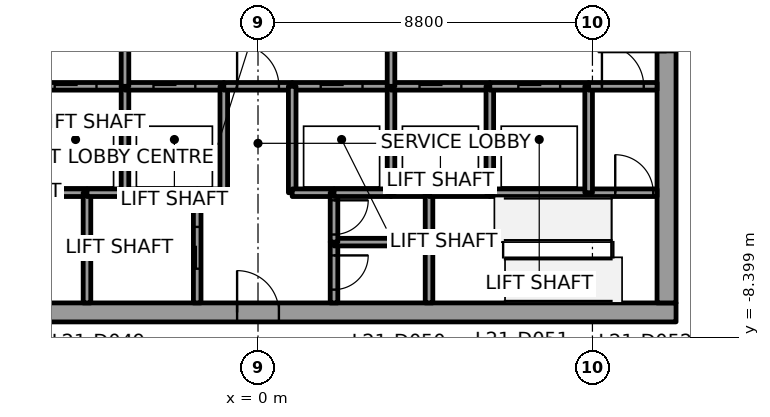
"""IFC4 building model, lengths in metres.
Left out: names, types, materials, properties, quantities, classifications, styles, units other than length and angle.
Written with IfcOpenShell. Run it as: python <this file> out.ifc"""

import sys

from ifc_helpers import new_model, si_unit, direction, frame, frame_2d, origin, place, context, subcontext, project, spatial, rectangle, extrude, element, fill, save


model = new_model("IFC4")
c1 = context("Model", 3, precision=1e-05, world=origin(), true_north=direction((0.0, 1.0)))
c2 = subcontext(c1, "Body", "Model", "MODEL_VIEW")
j1 = project(units=[si_unit("LENGTHUNIT", "METRE"), si_unit("PLANEANGLEUNIT", "RADIAN")], contexts=[c1])
p1 = place(None, origin())
s1 = spatial("IfcSite", under=j1, at=p1, CompositionType="ELEMENT")
p2 = place(p1, origin())
s2 = spatial("IfcBuilding", under=s1, at=p2, CompositionType="ELEMENT")
p3 = place(p2, frame((0.0, 0.0, 99.8)))
s3 = spatial("IfcBuildingStorey", under=s2, at=p3, CompositionType="ELEMENT", Elevation=99.8)
p4 = place(p3, frame((-11.0, -7.75, 0.0), z_axis=(0.0, 0.0, 1.0), x_axis=(1.0, 0.0, 0.0)))
e1 = element("IfcWall", 1, at=p4, inside=s3, PredefinedType="SHEAR", context=c2, shape_type="SweptSolid", body=[
    extrude(rectangle(XDim=22.0, YDim=0.5, at=frame_2d((11.0, 0.0))), origin(), (0.0, 0.0, 1.0), 3.7),
])
p5 = place(p4, frame((10.45, 0.0, 0.0)))
e2 = element("IfcOpeningElement", 2, at=p5, cuts=e1, PredefinedType="OPENING", context=c2, shape_type="SweptSolid", body=[
    extrude(rectangle(XDim=1.1, YDim=2.1, at=frame_2d((0.55, 1.05))), frame((0.0, 0.25, 0.0), z_axis=(0.0, -1.0, 0.0), x_axis=(1.0, 0.0, 0.0)), (0.0, 0.0, 1.0), 0.5),
])
p6 = place(p3, frame((10.75, -7.5, 0.0), z_axis=(0.0, 0.0, 1.0), x_axis=(0.0, 1.0, 0.0)))
e3 = element("IfcWall", 3, at=p6, inside=s3, PredefinedType="SHEAR", context=c2, shape_type="SweptSolid", body=[
    extrude(rectangle(XDim=15.0, YDim=0.5, at=frame_2d((7.5, 0.0))), origin(), (0.0, 0.0, 1.0), 3.7),
])
p7 = place(p6, frame((6.6, 0.0, 0.0)))
e4 = element("IfcOpeningElement", 4, at=p7, cuts=e3, PredefinedType="OPENING", context=c2, shape_type="SweptSolid", body=[
    extrude(rectangle(XDim=1.8, YDim=2.1, at=frame_2d((0.9, 1.05))), frame((0.0, 0.25, 0.0), z_axis=(0.0, -1.0, 0.0), x_axis=(1.0, 0.0, 0.0)), (0.0, 0.0, 1.0), 0.5),
])
p8 = place(p3, frame((-6.1, -4.6, 0.0), z_axis=(0.0, 0.0, 1.0), x_axis=(1.0, 0.0, 0.0)))
e5 = element("IfcWall", 5, at=p8, inside=s3, PredefinedType="SOLIDWALL", context=c2, shape_type="SweptSolid", body=[
    extrude(rectangle(XDim=1.6, YDim=0.2, at=frame_2d((0.8, 0.0))), origin(), (0.0, 0.0, 1.0), 3.55),
])
p9 = place(p3, frame((-6.1, -1.8, 0.0), z_axis=(0.0, 0.0, 1.0), x_axis=(1.0, 0.0, 0.0)))
e6 = element("IfcWall", 6, at=p9, inside=s3, PredefinedType="SOLIDWALL", context=c2, shape_type="SweptSolid", body=[
    extrude(rectangle(XDim=2.6, YDim=0.2, at=frame_2d((1.3, 0.0))), origin(), (0.0, 0.0, 1.0), 3.55),
])
p10 = place(p9, frame((0.75, 0.0, 0.0)))
e7 = element("IfcOpeningElement", 7, at=p10, cuts=e6, PredefinedType="OPENING", context=c2, shape_type="SweptSolid", body=[
    extrude(rectangle(XDim=1.1, YDim=2.1, at=frame_2d((0.55, 1.05))), frame((0.0, 0.1, 0.0), z_axis=(0.0, -1.0, 0.0), x_axis=(1.0, 0.0, 0.0)), (0.0, 0.0, 1.0), 0.2),
])
p11 = place(p3, frame((-4.5, -4.6, 0.0), z_axis=(0.0, 0.0, 1.0), x_axis=(0.0, -1.0, 0.0)))
e8 = element("IfcWall", 8, at=p11, inside=s3, PredefinedType="SOLIDWALL", context=c2, shape_type="SweptSolid", body=[
    extrude(rectangle(XDim=2.9, YDim=0.2, at=frame_2d((1.45, 0.0))), origin(), (0.0, 0.0, 1.0), 3.55),
])
p12 = place(p3, frame((-4.5, -4.6, 0.0), z_axis=(0.0, 0.0, 1.0), x_axis=(1.0, 0.0, 0.0)))
e9 = element("IfcWall", 9, at=p12, inside=s3, PredefinedType="SOLIDWALL", context=c2, shape_type="SweptSolid", body=[
    extrude(rectangle(XDim=1.0, YDim=0.2, at=frame_2d((0.5, 0.0))), origin(), (0.0, 0.0, 1.0), 3.55),
])
p13 = place(p3, frame((-3.5, -4.6, 0.0), z_axis=(0.0, 0.0, 1.0), x_axis=(1.0, 0.0, 0.0)))
e10 = element("IfcWall", 10, at=p13, inside=s3, PredefinedType="SOLIDWALL", context=c2, shape_type="SweptSolid", body=[
    extrude(rectangle(XDim=1.9, YDim=0.2, at=frame_2d((0.95, 0.0))), origin(), (0.0, 0.0, 1.0), 3.55),
])
p14 = place(p3, frame((-3.5, -4.6, 0.0), z_axis=(0.0, 0.0, 1.0), x_axis=(0.0, 1.0, 0.0)))
e11 = element("IfcWall", 11, at=p14, inside=s3, PredefinedType="SOLIDWALL", context=c2, shape_type="SweptSolid", body=[
    extrude(rectangle(XDim=2.8, YDim=0.2, at=frame_2d((1.4, 0.0))), origin(), (0.0, 0.0, 1.0), 3.55),
])
p15 = place(p3, frame((-3.5, -1.8, 0.0), z_axis=(0.0, 0.0, 1.0), x_axis=(1.0, 0.0, 0.0)))
e12 = element("IfcWall", 12, at=p15, inside=s3, PredefinedType="SOLIDWALL", context=c2, shape_type="SweptSolid", body=[
    extrude(rectangle(XDim=2.6, YDim=0.2, at=frame_2d((1.3, 0.0))), origin(), (0.0, 0.0, 1.0), 3.55),
])
p16 = place(p15, frame((0.75, 0.0, 0.0)))
e13 = element("IfcOpeningElement", 13, at=p16, cuts=e12, PredefinedType="OPENING", context=c2, shape_type="SweptSolid", body=[
    extrude(rectangle(XDim=1.1, YDim=2.1, at=frame_2d((0.55, 1.05))), frame((0.0, 0.1, 0.0), z_axis=(0.0, -1.0, 0.0), x_axis=(1.0, 0.0, 0.0)), (0.0, 0.0, 1.0), 0.2),
])
p17 = place(p3, frame((-3.5, 1.8, 0.0), z_axis=(0.0, 0.0, 1.0), x_axis=(0.0, -1.0, 0.0)))
e14 = element("IfcWall", 14, at=p17, inside=s3, PredefinedType="SOLIDWALL", context=c2, shape_type="SweptSolid", body=[
    extrude(rectangle(XDim=3.6, YDim=0.2, at=frame_2d((1.8, 0.0))), origin(), (0.0, 0.0, 1.0), 3.55),
])
p18 = place(p17, frame((1.05, 0.0, 0.0)))
e15 = element("IfcOpeningElement", 15, at=p18, cuts=e14, PredefinedType="OPENING", context=c2, shape_type="SweptSolid", body=[
    extrude(rectangle(XDim=1.5, YDim=2.1, at=frame_2d((0.75, 1.05))), frame((0.0, 0.1, 0.0), z_axis=(0.0, -1.0, 0.0), x_axis=(1.0, 0.0, 0.0)), (0.0, 0.0, 1.0), 0.2),
])
p19 = place(p3, frame((-1.6, -7.5, 0.0), z_axis=(0.0, 0.0, 1.0), x_axis=(0.0, 1.0, 0.0)))
e16 = element("IfcWall", 16, at=p19, inside=s3, PredefinedType="SOLIDWALL", context=c2, shape_type="SweptSolid", body=[
    extrude(rectangle(XDim=2.9, YDim=0.2, at=frame_2d((1.45, 0.0))), origin(), (0.0, 0.0, 1.0), 3.55),
])
p20 = place(p19, frame((0.9, 0.0, 0.0)))
e17 = element("IfcOpeningElement", 17, at=p20, cuts=e16, PredefinedType="OPENING", context=c2, shape_type="SweptSolid", body=[
    extrude(rectangle(XDim=1.1, YDim=2.1, at=frame_2d((0.55, 1.05))), frame((0.0, 0.1, 0.0), z_axis=(0.0, -1.0, 0.0), x_axis=(1.0, 0.0, 0.0)), (0.0, 0.0, 1.0), 0.2),
])
p21 = place(p3, frame((-1.6, -4.6, 0.0), z_axis=(0.0, 0.0, 1.0), x_axis=(1.0, 0.0, 0.0)))
e18 = element("IfcWall", 18, at=p21, inside=s3, PredefinedType="SOLIDWALL", context=c2, shape_type="SweptSolid", body=[
    extrude(rectangle(XDim=0.7, YDim=0.2, at=frame_2d((0.35, 0.0))), origin(), (0.0, 0.0, 1.0), 3.55),
])
p22 = place(p3, frame((-0.9, -4.6, 0.0), z_axis=(0.0, 0.0, 1.0), x_axis=(0.0, 1.0, 0.0)))
e19 = element("IfcWall", 19, at=p22, inside=s3, PredefinedType="SOLIDWALL", context=c2, shape_type="SweptSolid", body=[
    extrude(rectangle(XDim=2.8, YDim=0.2, at=frame_2d((1.4, 0.0))), origin(), (0.0, 0.0, 1.0), 3.55),
])
p23 = place(p3, frame((-0.9, -1.8, 0.0), z_axis=(0.0, 0.0, 1.0), x_axis=(1.0, 0.0, 0.0)))
e20 = element("IfcWall", 20, at=p23, inside=s3, PredefinedType="SOLIDWALL", context=c2, shape_type="SweptSolid", body=[
    extrude(rectangle(XDim=1.8, YDim=0.2, at=frame_2d((0.9, 0.0))), origin(), (0.0, 0.0, 1.0), 3.55),
])
p24 = place(p23, frame((0.35, 0.0, 0.0)))
e21 = element("IfcOpeningElement", 21, at=p24, cuts=e20, PredefinedType="OPENING", context=c2, shape_type="SweptSolid", body=[
    extrude(rectangle(XDim=1.1, YDim=2.1, at=frame_2d((0.55, 1.05))), frame((0.0, 0.1, 0.0), z_axis=(0.0, -1.0, 0.0), x_axis=(1.0, 0.0, 0.0)), (0.0, 0.0, 1.0), 0.2),
])
p25 = place(p3, frame((0.9, -1.8, 0.0), z_axis=(0.0, 0.0, 1.0), x_axis=(1.0, 0.0, 0.0)))
e22 = element("IfcWall", 22, at=p25, inside=s3, PredefinedType="SOLIDWALL", context=c2, shape_type="SweptSolid", body=[
    extrude(rectangle(XDim=2.6, YDim=0.2, at=frame_2d((1.3, 0.0))), origin(), (0.0, 0.0, 1.0), 3.55),
])
p26 = place(p25, frame((0.75, 0.0, 0.0)))
e23 = element("IfcOpeningElement", 23, at=p26, cuts=e22, PredefinedType="OPENING", context=c2, shape_type="SweptSolid", body=[
    extrude(rectangle(XDim=1.1, YDim=2.1, at=frame_2d((0.55, 1.05))), frame((0.0, 0.1, 0.0), z_axis=(0.0, -1.0, 0.0), x_axis=(1.0, 0.0, 0.0)), (0.0, 0.0, 1.0), 0.2),
])
p27 = place(p3, frame((0.9, -1.8, 0.0), z_axis=(0.0, 0.0, 1.0), x_axis=(0.0, -1.0, 0.0)))
e24 = element("IfcWall", 24, at=p27, inside=s3, PredefinedType="SOLIDWALL", context=c2, shape_type="SweptSolid", body=[
    extrude(rectangle(XDim=2.8, YDim=0.2, at=frame_2d((1.4, 0.0))), origin(), (0.0, 0.0, 1.0), 3.55),
])
p28 = place(p3, frame((0.9, -4.6, 0.0), z_axis=(0.0, 0.0, 1.0), x_axis=(1.0, 0.0, 0.0)))
e25 = element("IfcWall", 25, at=p28, inside=s3, PredefinedType="SOLIDWALL", context=c2, shape_type="SweptSolid", body=[
    extrude(rectangle(XDim=1.1, YDim=0.2, at=frame_2d((0.55, 0.0))), origin(), (0.0, 0.0, 1.0), 3.55),
])
p29 = place(p3, frame((2.0, -5.9, 0.0), z_axis=(0.0, 0.0, 1.0), x_axis=(0.0, -1.0, 0.0)))
e26 = element("IfcWall", 26, at=p29, inside=s3, PredefinedType="SOLIDWALL", context=c2, shape_type="SweptSolid", body=[
    extrude(rectangle(XDim=1.6, YDim=0.2, at=frame_2d((0.8, 0.0))), origin(), (0.0, 0.0, 1.0), 3.55),
])
p30 = place(p29, frame((0.35, 0.0, 0.0)))
e27 = element("IfcOpeningElement", 27, at=p30, cuts=e26, PredefinedType="OPENING", context=c2, shape_type="SweptSolid", body=[
    extrude(rectangle(XDim=0.9, YDim=2.1, at=frame_2d((0.45, 1.05))), frame((0.0, 0.1, 0.0), z_axis=(0.0, -1.0, 0.0), x_axis=(1.0, 0.0, 0.0)), (0.0, 0.0, 1.0), 0.2),
])
p31 = place(p3, frame((4.5, -5.9, 0.0), z_axis=(0.0, 0.0, 1.0), x_axis=(-1.0, 0.0, 0.0)))
e28 = element("IfcWall", 28, at=p31, inside=s3, PredefinedType="SOLIDWALL", context=c2, shape_type="SweptSolid", body=[
    extrude(rectangle(XDim=2.5, YDim=0.2, at=frame_2d((1.25, 0.0))), origin(), (0.0, 0.0, 1.0), 3.55),
])
p32 = place(p3, frame((2.0, -4.6, 0.0), z_axis=(0.0, 0.0, 1.0), x_axis=(0.0, -1.0, 0.0)))
e29 = element("IfcWall", 29, at=p32, inside=s3, PredefinedType="SOLIDWALL", context=c2, shape_type="SweptSolid", body=[
    extrude(rectangle(XDim=1.3, YDim=0.2, at=frame_2d((0.65, 0.0))), origin(), (0.0, 0.0, 1.0), 3.55),
])
p33 = place(p32, frame((0.2, 0.0, 0.0)))
e30 = element("IfcOpeningElement", 30, at=p33, cuts=e29, PredefinedType="OPENING", context=c2, shape_type="SweptSolid", body=[
    extrude(rectangle(XDim=0.9, YDim=2.1, at=frame_2d((0.45, 1.05))), frame((0.0, 0.1, 0.0), z_axis=(0.0, -1.0, 0.0), x_axis=(1.0, 0.0, 0.0)), (0.0, 0.0, 1.0), 0.2),
])
p34 = place(p3, frame((3.5, -4.6, 0.0), z_axis=(0.0, 0.0, 1.0), x_axis=(-1.0, 0.0, 0.0)))
e31 = element("IfcWall", 31, at=p34, inside=s3, PredefinedType="SOLIDWALL", context=c2, shape_type="SweptSolid", body=[
    extrude(rectangle(XDim=1.5, YDim=0.2, at=frame_2d((0.75, 0.0))), origin(), (0.0, 0.0, 1.0), 3.55),
])
p35 = place(p3, frame((4.5, -4.6, 0.0), z_axis=(0.0, 0.0, 1.0), x_axis=(-1.0, 0.0, 0.0)))
e32 = element("IfcWall", 32, at=p35, inside=s3, PredefinedType="SOLIDWALL", context=c2, shape_type="SweptSolid", body=[
    extrude(rectangle(XDim=1.0, YDim=0.2, at=frame_2d((0.5, 0.0))), origin(), (0.0, 0.0, 1.0), 3.55),
])
p36 = place(p3, frame((3.5, -4.6, 0.0), z_axis=(0.0, 0.0, 1.0), x_axis=(0.0, 1.0, 0.0)))
e33 = element("IfcWall", 33, at=p36, inside=s3, PredefinedType="SOLIDWALL", context=c2, shape_type="SweptSolid", body=[
    extrude(rectangle(XDim=2.8, YDim=0.2, at=frame_2d((1.4, 0.0))), origin(), (0.0, 0.0, 1.0), 3.55),
])
p37 = place(p3, frame((3.5, -1.8, 0.0), z_axis=(0.0, 0.0, 1.0), x_axis=(1.0, 0.0, 0.0)))
e34 = element("IfcWall", 34, at=p37, inside=s3, PredefinedType="SOLIDWALL", context=c2, shape_type="SweptSolid", body=[
    extrude(rectangle(XDim=2.6, YDim=0.2, at=frame_2d((1.3, 0.0))), origin(), (0.0, 0.0, 1.0), 3.55),
])
p38 = place(p37, frame((0.75, 0.0, 0.0)))
e35 = element("IfcOpeningElement", 35, at=p38, cuts=e34, PredefinedType="OPENING", context=c2, shape_type="SweptSolid", body=[
    extrude(rectangle(XDim=1.1, YDim=2.1, at=frame_2d((0.55, 1.05))), frame((0.0, 0.1, 0.0), z_axis=(0.0, -1.0, 0.0), x_axis=(1.0, 0.0, 0.0)), (0.0, 0.0, 1.0), 0.2),
])
p39 = place(p3, frame((3.5, -1.8, 0.0), z_axis=(0.0, 0.0, 1.0), x_axis=(0.0, 1.0, 0.0)))
e36 = element("IfcWall", 36, at=p39, inside=s3, PredefinedType="SOLIDWALL", context=c2, shape_type="SweptSolid", body=[
    extrude(rectangle(XDim=3.6, YDim=0.2, at=frame_2d((1.8, 0.0))), origin(), (0.0, 0.0, 1.0), 3.55),
])
p40 = place(p39, frame((1.05, 0.0, 0.0)))
e37 = element("IfcOpeningElement", 37, at=p40, cuts=e36, PredefinedType="OPENING", context=c2, shape_type="SweptSolid", body=[
    extrude(rectangle(XDim=1.5, YDim=2.1, at=frame_2d((0.75, 1.05))), frame((0.0, 0.1, 0.0), z_axis=(0.0, -1.0, 0.0), x_axis=(1.0, 0.0, 0.0)), (0.0, 0.0, 1.0), 0.2),
])
p41 = place(p3, frame((4.5, -7.5, 0.0), z_axis=(0.0, 0.0, 1.0), x_axis=(0.0, 1.0, 0.0)))
e38 = element("IfcWall", 38, at=p41, inside=s3, PredefinedType="SOLIDWALL", context=c2, shape_type="SweptSolid", body=[
    extrude(rectangle(XDim=1.6, YDim=0.2, at=frame_2d((0.8, 0.0))), origin(), (0.0, 0.0, 1.0), 3.55),
])
p42 = place(p3, frame((4.5, -5.9, 0.0), z_axis=(0.0, 0.0, 1.0), x_axis=(0.0, 1.0, 0.0)))
e39 = element("IfcWall", 39, at=p42, inside=s3, PredefinedType="SOLIDWALL", context=c2, shape_type="SweptSolid", body=[
    extrude(rectangle(XDim=1.3, YDim=0.2, at=frame_2d((0.65, 0.0))), origin(), (0.0, 0.0, 1.0), 3.55),
])
p43 = place(p3, frame((4.5, -4.6, 0.0), z_axis=(0.0, 0.0, 1.0), x_axis=(1.0, 0.0, 0.0)))
e40 = element("IfcWall", 40, at=p43, inside=s3, PredefinedType="SOLIDWALL", context=c2, shape_type="SweptSolid", body=[
    extrude(rectangle(XDim=1.6, YDim=0.2, at=frame_2d((0.8, 0.0))), origin(), (0.0, 0.0, 1.0), 3.55),
])
p44 = place(p3, frame((6.1, -4.6, 0.0), z_axis=(0.0, 0.0, 1.0), x_axis=(1.0, 0.0, 0.0)))
e41 = element("IfcWall", 41, at=p44, inside=s3, PredefinedType="SOLIDWALL", context=c2, shape_type="SweptSolid", body=[
    extrude(rectangle(XDim=2.6, YDim=0.2, at=frame_2d((1.3, 0.0))), origin(), (0.0, 0.0, 1.0), 3.55),
])
p45 = place(p3, frame((6.1, -4.6, 0.0), z_axis=(0.0, 0.0, 1.0), x_axis=(0.0, 1.0, 0.0)))
e42 = element("IfcWall", 42, at=p45, inside=s3, PredefinedType="SOLIDWALL", context=c2, shape_type="SweptSolid", body=[
    extrude(rectangle(XDim=2.8, YDim=0.2, at=frame_2d((1.4, 0.0))), origin(), (0.0, 0.0, 1.0), 3.55),
])
p46 = place(p3, frame((6.1, -1.8, 0.0), z_axis=(0.0, 0.0, 1.0), x_axis=(1.0, 0.0, 0.0)))
e43 = element("IfcWall", 43, at=p46, inside=s3, PredefinedType="SOLIDWALL", context=c2, shape_type="SweptSolid", body=[
    extrude(rectangle(XDim=2.6, YDim=0.2, at=frame_2d((1.3, 0.0))), origin(), (0.0, 0.0, 1.0), 3.55),
])
p47 = place(p46, frame((0.75, 0.0, 0.0)))
e44 = element("IfcOpeningElement", 44, at=p47, cuts=e43, PredefinedType="OPENING", context=c2, shape_type="SweptSolid", body=[
    extrude(rectangle(XDim=1.1, YDim=2.1, at=frame_2d((0.55, 1.05))), frame((0.0, 0.1, 0.0), z_axis=(0.0, -1.0, 0.0), x_axis=(1.0, 0.0, 0.0)), (0.0, 0.0, 1.0), 0.2),
])
p48 = place(p3, frame((8.7, -4.6, 0.0), z_axis=(0.0, 0.0, 1.0), x_axis=(1.0, 0.0, 0.0)))
e45 = element("IfcWall", 45, at=p48, inside=s3, PredefinedType="SOLIDWALL", context=c2, shape_type="SweptSolid", body=[
    extrude(rectangle(XDim=1.8, YDim=0.2, at=frame_2d((0.9, 0.0))), origin(), (0.0, 0.0, 1.0), 3.55),
])
p49 = place(p48, frame((0.7, 0.0, 0.0)))
e46 = element("IfcOpeningElement", 46, at=p49, cuts=e45, PredefinedType="OPENING", context=c2, shape_type="SweptSolid", body=[
    extrude(rectangle(XDim=1.0, YDim=2.1, at=frame_2d((0.5, 1.05))), frame((0.0, 0.1, 0.0), z_axis=(0.0, -1.0, 0.0), x_axis=(1.0, 0.0, 0.0)), (0.0, 0.0, 1.0), 0.2),
])
p50 = place(p3, frame((8.7, -1.8, 0.0), z_axis=(0.0, 0.0, 1.0), x_axis=(0.0, -1.0, 0.0)))
e47 = element("IfcWall", 47, at=p50, inside=s3, PredefinedType="SOLIDWALL", context=c2, shape_type="SweptSolid", body=[
    extrude(rectangle(XDim=2.8, YDim=0.2, at=frame_2d((1.4, 0.0))), origin(), (0.0, 0.0, 1.0), 3.55),
])
p51 = place(p3, frame((8.7, -1.8, 0.0), z_axis=(0.0, 0.0, 1.0), x_axis=(1.0, 0.0, 0.0)))
e48 = element("IfcWall", 48, at=p51, inside=s3, PredefinedType="SOLIDWALL", context=c2, shape_type="SweptSolid", body=[
    extrude(rectangle(XDim=1.8, YDim=0.2, at=frame_2d((0.9, 0.0))), origin(), (0.0, 0.0, 1.0), 3.55),
])
p52 = place(p51, frame((0.35, 0.0, 0.0)))
e49 = element("IfcOpeningElement", 49, at=p52, cuts=e48, PredefinedType="OPENING", context=c2, shape_type="SweptSolid", body=[
    extrude(rectangle(XDim=1.1, YDim=2.1, at=frame_2d((0.55, 1.05))), frame((0.0, 0.1, 0.0), z_axis=(0.0, -1.0, 0.0), x_axis=(1.0, 0.0, 0.0)), (0.0, 0.0, 1.0), 0.2),
])
p53 = place(p10, origin())
e50 = element("IfcDoor", 50, at=p53, inside=s3, OperationType="SLIDING_TO_LEFT", PredefinedType="DOOR", context=c2, shape_type="SweptSolid", body=[
    extrude(rectangle(XDim=1.1, YDim=2.1, at=frame_2d((0.55, 1.05))), frame((0.0, 0.025, 0.0), z_axis=(0.0, -1.0, 0.0), x_axis=(1.0, 0.0, 0.0)), (0.0, 0.0, 1.0), 0.05),
])
fill(e7, e50)
p54 = place(p16, origin())
e51 = element("IfcDoor", 51, at=p54, inside=s3, OperationType="SLIDING_TO_LEFT", PredefinedType="DOOR", context=c2, shape_type="SweptSolid", body=[
    extrude(rectangle(XDim=1.1, YDim=2.1, at=frame_2d((0.55, 1.05))), frame((0.0, 0.025, 0.0), z_axis=(0.0, -1.0, 0.0), x_axis=(1.0, 0.0, 0.0)), (0.0, 0.0, 1.0), 0.05),
])
fill(e13, e51)
p55 = place(p26, origin())
e52 = element("IfcDoor", 52, at=p55, inside=s3, OperationType="SLIDING_TO_RIGHT", PredefinedType="DOOR", context=c2, shape_type="SweptSolid", body=[
    extrude(rectangle(XDim=1.1, YDim=2.1, at=frame_2d((0.55, 1.05))), frame((0.0, 0.025, 0.0), z_axis=(0.0, -1.0, 0.0), x_axis=(1.0, 0.0, 0.0)), (0.0, 0.0, 1.0), 0.05),
])
fill(e23, e52)
p56 = place(p38, origin())
e53 = element("IfcDoor", 53, at=p56, inside=s3, OperationType="SLIDING_TO_LEFT", PredefinedType="DOOR", context=c2, shape_type="SweptSolid", body=[
    extrude(rectangle(XDim=1.1, YDim=2.1, at=frame_2d((0.55, 1.05))), frame((0.0, 0.025, 0.0), z_axis=(0.0, -1.0, 0.0), x_axis=(1.0, 0.0, 0.0)), (0.0, 0.0, 1.0), 0.05),
])
fill(e35, e53)
p57 = place(p47, origin())
e54 = element("IfcDoor", 54, at=p57, inside=s3, OperationType="SLIDING_TO_LEFT", PredefinedType="DOOR", context=c2, shape_type="SweptSolid", body=[
    extrude(rectangle(XDim=1.1, YDim=2.1, at=frame_2d((0.55, 1.05))), frame((0.0, 0.025, 0.0), z_axis=(0.0, -1.0, 0.0), x_axis=(1.0, 0.0, 0.0)), (0.0, 0.0, 1.0), 0.05),
])
fill(e44, e54)
p58 = place(p20, origin())
e55 = element("IfcDoor", 55, at=p58, inside=s3, OperationType="SLIDING_TO_LEFT", PredefinedType="DOOR", context=c2, shape_type="SweptSolid", body=[
    extrude(rectangle(XDim=1.1, YDim=2.1, at=frame_2d((0.55, 1.05))), frame((0.0, 0.025, 0.0), z_axis=(0.0, -1.0, 0.0), x_axis=(1.0, 0.0, 0.0)), (0.0, 0.0, 1.0), 0.05),
])
fill(e17, e55)
p59 = place(p52, origin())
e56 = element("IfcDoor", 56, at=p59, inside=s3, OperationType="SINGLE_SWING_LEFT", PredefinedType="DOOR", context=c2, shape_type="SweptSolid", body=[
    extrude(rectangle(XDim=1.1, YDim=2.1, at=frame_2d((0.55, 1.05))), frame((0.0, 0.025, 0.0), z_axis=(0.0, -1.0, 0.0), x_axis=(1.0, 0.0, 0.0)), (0.0, 0.0, 1.0), 0.05),
])
fill(e49, e56)
p60 = place(p24, origin())
e57 = element("IfcDoor", 57, at=p60, inside=s3, OperationType="SINGLE_SWING_LEFT", PredefinedType="DOOR", context=c2, shape_type="SweptSolid", body=[
    extrude(rectangle(XDim=1.1, YDim=2.1, at=frame_2d((0.55, 1.05))), frame((0.0, 0.025, 0.0), z_axis=(0.0, -1.0, 0.0), x_axis=(1.0, 0.0, 0.0)), (0.0, 0.0, 1.0), 0.05),
])
fill(e21, e57)
p61 = place(p49, origin())
e58 = element("IfcDoor", 58, at=p61, inside=s3, OperationType="SINGLE_SWING_RIGHT", PredefinedType="DOOR", context=c2, shape_type="SweptSolid", body=[
    extrude(rectangle(XDim=1.0, YDim=2.1, at=frame_2d((0.5, 1.05))), frame((0.0, 0.025, 0.0), z_axis=(0.0, -1.0, 0.0), x_axis=(1.0, 0.0, 0.0)), (0.0, 0.0, 1.0), 0.05),
])
fill(e46, e58)
p62 = place(p30, origin())
e59 = element("IfcDoor", 59, at=p62, inside=s3, OperationType="SINGLE_SWING_LEFT", PredefinedType="DOOR", context=c2, shape_type="SweptSolid", body=[
    extrude(rectangle(XDim=0.9, YDim=2.1, at=frame_2d((0.45, 1.05))), frame((0.0, 0.025, 0.0), z_axis=(0.0, -1.0, 0.0), x_axis=(1.0, 0.0, 0.0)), (0.0, 0.0, 1.0), 0.05),
])
fill(e27, e59)
p63 = place(p33, origin())
e60 = element("IfcDoor", 60, at=p63, inside=s3, OperationType="SINGLE_SWING_LEFT", PredefinedType="DOOR", context=c2, shape_type="SweptSolid", body=[
    extrude(rectangle(XDim=0.9, YDim=2.1, at=frame_2d((0.45, 1.05))), frame((0.0, 0.025, 0.0), z_axis=(0.0, -1.0, 0.0), x_axis=(1.0, 0.0, 0.0)), (0.0, 0.0, 1.0), 0.05),
])
fill(e30, e60)
p64 = place(p7, origin())
e61 = element("IfcDoor", 61, at=p64, inside=s3, OperationType="DOUBLE_DOOR_SINGLE_SWING", PredefinedType="DOOR", context=c2, shape_type="SweptSolid", body=[
    extrude(rectangle(XDim=1.8, YDim=2.1, at=frame_2d((0.9, 1.05))), frame((0.0, 0.025, 0.0), z_axis=(0.0, -1.0, 0.0), x_axis=(1.0, 0.0, 0.0)), (0.0, 0.0, 1.0), 0.05),
])
fill(e4, e61)
p65 = place(p5, origin())
e62 = element("IfcDoor", 62, at=p65, inside=s3, OperationType="SINGLE_SWING_LEFT", PredefinedType="DOOR", context=c2, shape_type="SweptSolid", body=[
    extrude(rectangle(XDim=1.1, YDim=2.1, at=frame_2d((0.55, 1.05))), frame((0.0, 0.025, 0.0), z_axis=(0.0, -1.0, 0.0), x_axis=(1.0, 0.0, 0.0)), (0.0, 0.0, 1.0), 0.05),
])
fill(e2, e62)
save(model, sys.argv[1])
